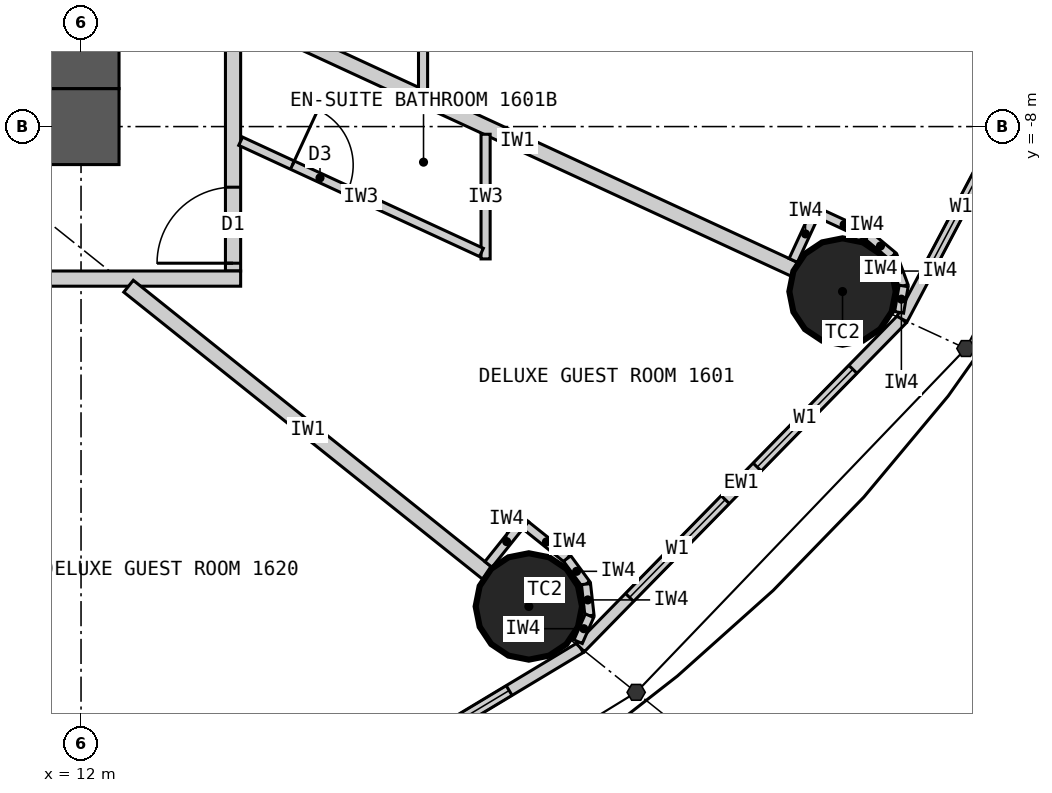
"""IFC4 building model, lengths in metres.
Left out: names, types, materials, properties, quantities, classifications, styles, units other than length and angle.
Written with IfcOpenShell. Run it as: python <this file> out.ifc"""

import sys

from ifc_helpers import new_model, si_unit, direction, frame, frame_2d, origin, origin_2d, place, context, subcontext, project, spatial, rectangle, circle, extrude, element, fill, save


model = new_model("IFC4")
c1 = context("Model", 3, precision=1e-05, world=origin(), true_north=direction((0.0, 1.0)))
c2 = subcontext(c1, "Body", "Model", "MODEL_VIEW")
j1 = project(units=[si_unit("LENGTHUNIT", "METRE"), si_unit("PLANEANGLEUNIT", "RADIAN")], contexts=[c1])
p1 = place(None, origin())
s1 = spatial("IfcSite", under=j1, at=p1, CompositionType="ELEMENT")
p2 = place(p1, origin())
s2 = spatial("IfcBuilding", under=s1, at=p2, CompositionType="ELEMENT")
p3 = place(p2, frame((0.0, 0.0, 67.2)))
s3 = spatial("IfcBuildingStorey", under=s2, at=p3, CompositionType="ELEMENT", Elevation=67.2)
for number, where, z_axis, x_axis in (
    (1, (17.892, -14.313, 0.0), (0.0, 0.0, 1.0), (1.0, 0.0, 0.0)),
    (2, (22.019, -10.17, 0.0), (0.0, 0.0, 1.0), (1.0, 0.0, 0.0)),
):
    element("IfcColumn", number, at=place(p3, frame(where, z_axis=z_axis, x_axis=x_axis)), inside=s3, PredefinedType="COLUMN", context=c2, shape_type="SweptSolid", body=[
        extrude(circle(Radius=0.7, at=origin_2d()), origin(), (0.0, 0.0, 1.0), 3.3),
    ])
p4 = place(p3, frame((12.5, -8.0, 0.0), z_axis=(0.0, 0.0, 1.0), x_axis=(-1.0, 0.0, 0.0)))
e3 = element("IfcWall", 3, at=p4, inside=s3, PredefinedType="SHEAR", context=c2, shape_type="SweptSolid", body=[
    extrude(rectangle(XDim=25.0, YDim=1.0, at=frame_2d((12.5, 0.0))), origin(), (0.0, 0.0, 1.0), 3.3),
])
p5 = place(p4, frame((11.2, 0.0, 0.0)))
e4 = element("IfcOpeningElement", 4, at=p5, cuts=e3, PredefinedType="OPENING", context=c2, shape_type="SweptSolid", body=[
    extrude(rectangle(XDim=1.2, YDim=2.2, at=frame_2d((0.6, 1.1))), frame((0.0, 0.51, 0.0), z_axis=(0.0, -1.0, 0.0), x_axis=(1.0, 0.0, 0.0)), (0.0, 0.0, 1.0), 1.02),
])
p6 = place(p4, frame((18.8, 0.0, 0.0)))
e5 = element("IfcOpeningElement", 5, at=p6, cuts=e3, PredefinedType="OPENING", context=c2, shape_type="SweptSolid", body=[
    extrude(rectangle(XDim=0.9, YDim=2.2, at=frame_2d((0.45, 1.1))), frame((0.0, 0.51, 0.0), z_axis=(0.0, -1.0, 0.0), x_axis=(1.0, 0.0, 0.0)), (0.0, 0.0, 1.0), 1.02),
])
p7 = place(p3, frame((12.0, -7.5, 0.0), z_axis=(0.0, 0.0, 1.0), x_axis=(0.0, 1.0, 0.0)))
e6 = element("IfcWall", 6, at=p7, inside=s3, PredefinedType="SHEAR", context=c2, shape_type="SweptSolid", body=[
    extrude(rectangle(XDim=15.0, YDim=1.0, at=frame_2d((7.5, 0.0))), origin(), (0.0, 0.0, 1.0), 3.3),
])
p8 = place(p7, frame((6.6, 0.0, 0.0)))
e7 = element("IfcOpeningElement", 7, at=p8, cuts=e6, PredefinedType="OPENING", context=c2, shape_type="SweptSolid", body=[
    extrude(rectangle(XDim=1.8, YDim=2.2, at=frame_2d((0.9, 1.1))), frame((0.0, 0.51, 0.0), z_axis=(0.0, -1.0, 0.0), x_axis=(1.0, 0.0, 0.0)), (0.0, 0.0, 1.0), 1.02),
])
p9 = place(p3, frame((13.096, -18.147, 0.0), z_axis=(0.0, 0.0, 1.0), x_axis=(0.856983180864, 0.515344377787, 0.0)))
e8 = element("IfcWall", 8, at=p9, inside=s3, PredefinedType="ELEMENTEDWALL", context=c2, shape_type="SweptSolid", body=[
    extrude(rectangle(XDim=6.386, YDim=0.15, at=frame_2d((3.193, 0.0))), origin(), (0.0, 0.0, 1.0), 3.12),
])
p10 = place(p9, frame((1.093, 0.0, 0.9)))
e9 = element("IfcOpeningElement", 9, at=p10, cuts=e8, PredefinedType="OPENING", context=c2, shape_type="SweptSolid", body=[
    extrude(rectangle(XDim=1.8, YDim=1.9, at=frame_2d((0.9, 0.95))), frame((0.0, 0.085, 0.0), z_axis=(0.0, -1.0, 0.0), x_axis=(1.0, 0.0, 0.0)), (0.0, 0.0, 1.0), 0.17),
])
p11 = place(p9, frame((3.493, 0.0, 0.9)))
e10 = element("IfcOpeningElement", 10, at=p11, cuts=e8, PredefinedType="OPENING", context=c2, shape_type="SweptSolid", body=[
    extrude(rectangle(XDim=1.8, YDim=1.9, at=frame_2d((0.9, 0.95))), frame((0.0, 0.085, 0.0), z_axis=(0.0, -1.0, 0.0), x_axis=(1.0, 0.0, 0.0)), (0.0, 0.0, 1.0), 0.17),
])
p12 = place(p3, frame((18.57, -14.856, 0.0), z_axis=(0.0, 0.0, 1.0), x_axis=(0.699602905915, 0.714531856557, 0.0)))
e11 = element("IfcWall", 11, at=p12, inside=s3, PredefinedType="ELEMENTEDWALL", context=c2, shape_type="SweptSolid", body=[
    extrude(rectangle(XDim=6.051, YDim=0.15, at=frame_2d((3.025, 0.0))), origin(), (0.0, 0.0, 1.0), 3.12),
])
p13 = place(p12, frame((0.926, 0.0, 0.9)))
e12 = element("IfcOpeningElement", 12, at=p13, cuts=e11, PredefinedType="OPENING", context=c2, shape_type="SweptSolid", body=[
    extrude(rectangle(XDim=1.8, YDim=1.9, at=frame_2d((0.9, 0.95))), frame((0.0, 0.085, 0.0), z_axis=(0.0, -1.0, 0.0), x_axis=(1.0, 0.0, 0.0)), (0.0, 0.0, 1.0), 0.17),
])
p14 = place(p12, frame((3.325, 0.0, 0.9)))
e13 = element("IfcOpeningElement", 13, at=p14, cuts=e11, PredefinedType="OPENING", context=c2, shape_type="SweptSolid", body=[
    extrude(rectangle(XDim=1.8, YDim=1.9, at=frame_2d((0.9, 0.95))), frame((0.0, 0.085, 0.0), z_axis=(0.0, -1.0, 0.0), x_axis=(1.0, 0.0, 0.0)), (0.0, 0.0, 1.0), 0.17),
])
p15 = place(p3, frame((22.803, -10.532, 0.0), z_axis=(0.0, 0.0, 1.0), x_axis=(0.467296867008, 0.884100468321, 0.0)))
e14 = element("IfcWall", 14, at=p15, inside=s3, PredefinedType="ELEMENTEDWALL", context=c2, shape_type="SweptSolid", body=[
    extrude(rectangle(XDim=5.734, YDim=0.15, at=frame_2d((2.867, 0.0))), origin(), (0.0, 0.0, 1.0), 3.12),
])
p16 = place(p15, frame((0.767, 0.0, 0.9)))
e15 = element("IfcOpeningElement", 15, at=p16, cuts=e14, PredefinedType="OPENING", context=c2, shape_type="SweptSolid", body=[
    extrude(rectangle(XDim=1.8, YDim=1.9, at=frame_2d((0.9, 0.95))), frame((0.0, 0.085, 0.0), z_axis=(0.0, -1.0, 0.0), x_axis=(1.0, 0.0, 0.0)), (0.0, 0.0, 1.0), 0.17),
])
p17 = place(p15, frame((3.167, 0.0, 0.9)))
e16 = element("IfcOpeningElement", 16, at=p17, cuts=e14, PredefinedType="OPENING", context=c2, shape_type="SweptSolid", body=[
    extrude(rectangle(XDim=1.8, YDim=1.9, at=frame_2d((0.9, 0.95))), frame((0.0, 0.085, 0.0), z_axis=(0.0, -1.0, 0.0), x_axis=(1.0, 0.0, 0.0)), (0.0, 0.0, 1.0), 0.17),
])
p18 = place(p3, frame((14.0, -9.9, 0.0), z_axis=(0.0, 0.0, 1.0), x_axis=(0.0, 1.0, 0.0)))
e17 = element("IfcWall", 17, at=p18, inside=s3, PredefinedType="PARTITIONING", context=c2, shape_type="SweptSolid", body=[
    extrude(rectangle(XDim=19.8, YDim=0.2, at=frame_2d((9.9, 0.0))), origin(), (0.0, 0.0, 1.0), 3.12),
])
p19 = place(p18, frame((0.103, 0.0, 0.0)))
e18 = element("IfcOpeningElement", 18, at=p19, cuts=e17, PredefinedType="OPENING", context=c2, shape_type="SweptSolid", body=[
    extrude(rectangle(XDim=1.0, YDim=2.2, at=frame_2d((0.5, 1.1))), frame((0.0, 0.11, 0.0), z_axis=(0.0, -1.0, 0.0), x_axis=(1.0, 0.0, 0.0)), (0.0, 0.0, 1.0), 0.22),
])
p20 = place(p18, frame((5.248, 0.0, 0.0)))
e19 = element("IfcOpeningElement", 19, at=p20, cuts=e17, PredefinedType="OPENING", context=c2, shape_type="SweptSolid", body=[
    extrude(rectangle(XDim=1.0, YDim=2.2, at=frame_2d((0.5, 1.1))), frame((0.0, 0.11, 0.0), z_axis=(0.0, -1.0, 0.0), x_axis=(1.0, 0.0, 0.0)), (0.0, 0.0, 1.0), 0.22),
])
p21 = place(p18, frame((8.438, 0.0, 0.0)))
e20 = element("IfcOpeningElement", 20, at=p21, cuts=e17, PredefinedType="OPENING", context=c2, shape_type="SweptSolid", body=[
    extrude(rectangle(XDim=1.0, YDim=2.2, at=frame_2d((0.5, 1.1))), frame((0.0, 0.11, 0.0), z_axis=(0.0, -1.0, 0.0), x_axis=(1.0, 0.0, 0.0)), (0.0, 0.0, 1.0), 0.22),
])
p22 = place(p18, frame((14.532, 0.0, 0.0)))
e21 = element("IfcOpeningElement", 21, at=p22, cuts=e17, PredefinedType="OPENING", context=c2, shape_type="SweptSolid", body=[
    extrude(rectangle(XDim=1.0, YDim=2.2, at=frame_2d((0.5, 1.1))), frame((0.0, 0.11, 0.0), z_axis=(0.0, -1.0, 0.0), x_axis=(1.0, 0.0, 0.0)), (0.0, 0.0, 1.0), 0.22),
])
p23 = place(p3, frame((14.1, -10.0, 0.0), z_axis=(0.0, 0.0, 1.0), x_axis=(-1.0, 0.0, 0.0)))
e22 = element("IfcWall", 22, at=p23, inside=s3, PredefinedType="PARTITIONING", context=c2, shape_type="SweptSolid", body=[
    extrude(rectangle(XDim=28.2, YDim=0.2, at=frame_2d((14.1, 0.0))), origin(), (0.0, 0.0, 1.0), 3.12),
])
p24 = place(p23, frame((23.865, 0.0, 0.0)))
e23 = element("IfcOpeningElement", 23, at=p24, cuts=e22, PredefinedType="OPENING", context=c2, shape_type="SweptSolid", body=[
    extrude(rectangle(XDim=1.0, YDim=2.2, at=frame_2d((0.5, 1.1))), frame((0.0, 0.11, 0.0), z_axis=(0.0, -1.0, 0.0), x_axis=(1.0, 0.0, 0.0)), (0.0, 0.0, 1.0), 0.22),
])
p25 = place(p23, frame((18.529, 0.0, 0.0)))
e24 = element("IfcOpeningElement", 24, at=p25, cuts=e22, PredefinedType="OPENING", context=c2, shape_type="SweptSolid", body=[
    extrude(rectangle(XDim=1.0, YDim=2.2, at=frame_2d((0.5, 1.1))), frame((0.0, 0.11, 0.0), z_axis=(0.0, -1.0, 0.0), x_axis=(1.0, 0.0, 0.0)), (0.0, 0.0, 1.0), 0.22),
])
p26 = place(p23, frame((14.623, 0.0, 0.0)))
e25 = element("IfcOpeningElement", 25, at=p26, cuts=e22, PredefinedType="OPENING", context=c2, shape_type="SweptSolid", body=[
    extrude(rectangle(XDim=1.0, YDim=2.2, at=frame_2d((0.5, 1.1))), frame((0.0, 0.11, 0.0), z_axis=(0.0, -1.0, 0.0), x_axis=(1.0, 0.0, 0.0)), (0.0, 0.0, 1.0), 0.22),
])
p27 = place(p23, frame((11.24, 0.0, 0.0)))
e26 = element("IfcOpeningElement", 26, at=p27, cuts=e22, PredefinedType="OPENING", context=c2, shape_type="SweptSolid", body=[
    extrude(rectangle(XDim=1.0, YDim=2.2, at=frame_2d((0.5, 1.1))), frame((0.0, 0.11, 0.0), z_axis=(0.0, -1.0, 0.0), x_axis=(1.0, 0.0, 0.0)), (0.0, 0.0, 1.0), 0.22),
])
p28 = place(p23, frame((8.671, 0.0, 0.0)))
e27 = element("IfcOpeningElement", 27, at=p28, cuts=e22, PredefinedType="OPENING", context=c2, shape_type="SweptSolid", body=[
    extrude(rectangle(XDim=1.0, YDim=2.2, at=frame_2d((0.5, 1.1))), frame((0.0, 0.11, 0.0), z_axis=(0.0, -1.0, 0.0), x_axis=(1.0, 0.0, 0.0)), (0.0, 0.0, 1.0), 0.22),
])
p29 = place(p23, frame((2.801, 0.0, 0.0)))
e28 = element("IfcOpeningElement", 28, at=p29, cuts=e22, PredefinedType="OPENING", context=c2, shape_type="SweptSolid", body=[
    extrude(rectangle(XDim=1.0, YDim=2.2, at=frame_2d((0.5, 1.1))), frame((0.0, 0.11, 0.0), z_axis=(0.0, -1.0, 0.0), x_axis=(1.0, 0.0, 0.0)), (0.0, 0.0, 1.0), 0.22),
])
p30 = place(p3, frame((7.289, -10.1, 0.0), z_axis=(0.0, 0.0, 1.0), x_axis=(0.585198353053, -0.810890182197, 0.0)))
e29 = element("IfcWall", 29, at=p30, inside=s3, PredefinedType="PARTITIONING", context=c2, shape_type="SweptSolid", body=[
    extrude(rectangle(XDim=8.36, YDim=0.2, at=frame_2d((4.18, 0.0))), origin(), (0.0, 0.0, 1.0), 2.32),
])
p31 = place(p3, frame((12.625, -10.1, 0.0), z_axis=(0.0, 0.0, 1.0), x_axis=(0.780892451574, -0.624665493744, 0.0)))
e30 = element("IfcWall", 30, at=p31, inside=s3, PredefinedType="PARTITIONING", context=c2, shape_type="SweptSolid", body=[
    extrude(rectangle(XDim=6.045, YDim=0.2, at=frame_2d((3.022, 0.0))), origin(), (0.0, 0.0, 1.0), 2.32),
])
p32 = place(p3, frame((14.1, -6.512, 0.0), z_axis=(0.0, 0.0, 1.0), x_axis=(0.907832871056, -0.419332181247, 0.0)))
e31 = element("IfcWall", 31, at=p32, inside=s3, PredefinedType="PARTITIONING", context=c2, shape_type="SweptSolid", body=[
    extrude(rectangle(XDim=8.023, YDim=0.2, at=frame_2d((4.011, 0.0))), origin(), (0.0, 0.0, 1.0), 2.32),
])
p33 = place(p3, frame((17.323, -8.101, 0.0), z_axis=(0.0, 0.0, 1.0), x_axis=(0.0, -1.0, 0.0)))
e32 = element("IfcWall", 32, at=p33, inside=s3, PredefinedType="PARTITIONING", context=c2, shape_type="SweptSolid", body=[
    extrude(rectangle(XDim=1.64, YDim=0.12, at=frame_2d((0.82, 0.0))), origin(), (0.0, 0.0, 1.0), 3.12),
])
p34 = place(p3, frame((14.1, -8.193, 0.0), z_axis=(0.0, 0.0, 1.0), x_axis=(0.907836493557, -0.419324338628, 0.0)))
e33 = element("IfcWall", 33, at=p34, inside=s3, PredefinedType="PARTITIONING", context=c2, shape_type="SweptSolid", body=[
    extrude(rectangle(XDim=3.49, YDim=0.12, at=frame_2d((1.745, 0.0))), origin(), (0.0, 0.0, 1.0), 3.12),
])
p35 = place(p34, frame((0.75, 0.0, 0.0)))
e34 = element("IfcOpeningElement", 34, at=p35, cuts=e33, PredefinedType="OPENING", context=c2, shape_type="SweptSolid", body=[
    extrude(rectangle(XDim=0.8, YDim=2.1, at=frame_2d((0.4, 1.05))), frame((0.0, 0.07, 0.0), z_axis=(0.0, -1.0, 0.0), x_axis=(1.0, 0.0, 0.0)), (0.0, 0.0, 1.0), 0.14),
])
p36 = place(p3, frame((16.5, -7.521, 0.0), z_axis=(0.0, 0.0, 1.0), x_axis=(0.0, 1.0, 0.0)))
e35 = element("IfcWall", 35, at=p36, inside=s3, PredefinedType="PARTITIONING", context=c2, shape_type="SweptSolid", body=[
    extrude(rectangle(XDim=2.749, YDim=0.12, at=frame_2d((1.374, 0.0))), origin(), (0.0, 0.0, 1.0), 3.12),
])
p37 = place(p3, frame((17.361, -13.76, 0.0), z_axis=(0.0, 0.0, 1.0), x_axis=(0.624501042889, 0.781023973659, 0.0)))
e36 = element("IfcWall", 36, at=p37, inside=s3, PredefinedType="PARTITIONING", context=c2, shape_type="SweptSolid", body=[
    extrude(rectangle(XDim=0.767, YDim=0.12, at=frame_2d((0.384, 0.0))), origin(), (0.0, 0.0, 1.0), 3.12),
])
p38 = place(p3, frame((17.85, -13.246, 0.0), z_axis=(0.0, 0.0, 1.0), x_axis=(0.780902834923, -0.62465251333, 0.0)))
e37 = element("IfcWall", 37, at=p38, inside=s3, PredefinedType="PARTITIONING", context=c2, shape_type="SweptSolid", body=[
    extrude(rectangle(XDim=0.7, YDim=0.12, at=frame_2d((0.35, 0.0))), origin(), (0.0, 0.0, 1.0), 3.12),
])
for number, where, z_axis, x_axis in (
    (38, (18.396, -13.683, 0.0), (0.0, 0.0, 1.0), (0.592, -0.806, 0.0)),
    (39, (18.644, -14.02, 0.0), (0.0, 0.0, 1.0), (0.11, -0.994, 0.0)),
):
    element("IfcWall", number, at=place(p3, frame(where, z_axis=z_axis, x_axis=x_axis)), inside=s3, PredefinedType="PARTITIONING", context=c2, shape_type="SweptSolid", body=[
        extrude(rectangle(XDim=0.418, YDim=0.12, at=frame_2d((0.209, 0.0))), origin(), (0.0, 0.0, 1.0), 3.12),
    ])
p39 = place(p3, frame((18.69, -14.435, 0.0), z_axis=(0.0, 0.0, 1.0), x_axis=(-0.401093412634, -0.91603715773, 0.0)))
e40 = element("IfcWall", 40, at=p39, inside=s3, PredefinedType="PARTITIONING", context=c2, shape_type="SweptSolid", body=[
    extrude(rectangle(XDim=0.373, YDim=0.12, at=frame_2d((0.187, 0.0))), origin(), (0.0, 0.0, 1.0), 3.12),
])
p40 = place(p3, frame((21.371, -9.761, 0.0), z_axis=(0.0, 0.0, 1.0), x_axis=(0.419259891039, 0.907866258744, 0.0)))
e41 = element("IfcWall", 41, at=p40, inside=s3, PredefinedType="PARTITIONING", context=c2, shape_type="SweptSolid", body=[
    extrude(rectangle(XDim=0.768, YDim=0.12, at=frame_2d((0.384, 0.0))), origin(), (0.0, 0.0, 1.0), 3.12),
])
p41 = place(p3, frame((21.722, -9.144, 0.0), z_axis=(0.0, 0.0, 1.0), x_axis=(0.907877701396, -0.419235112208, 0.0)))
e42 = element("IfcWall", 42, at=p41, inside=s3, PredefinedType="PARTITIONING", context=c2, shape_type="SweptSolid", body=[
    extrude(rectangle(XDim=0.7, YDim=0.12, at=frame_2d((0.35, 0.0))), origin(), (0.0, 0.0, 1.0), 3.12),
])
p42 = place(p3, frame((22.358, -9.437, 0.0), z_axis=(0.0, 0.0, 1.0), x_axis=(0.768412687942, -0.639954639806, 0.0)))
e43 = element("IfcWall", 43, at=p42, inside=s3, PredefinedType="PARTITIONING", context=c2, shape_type="SweptSolid", body=[
    extrude(rectangle(XDim=0.418, YDim=0.12, at=frame_2d((0.209, 0.0))), origin(), (0.0, 0.0, 1.0), 3.12),
])
p43 = place(p3, frame((22.679, -9.705, 0.0), z_axis=(0.0, 0.0, 1.0), x_axis=(0.345164001646, -0.938542386879, 0.0)))
e44 = element("IfcWall", 44, at=p43, inside=s3, PredefinedType="PARTITIONING", context=c2, shape_type="SweptSolid", body=[
    extrude(rectangle(XDim=0.418, YDim=0.12, at=frame_2d((0.209, 0.0))), origin(), (0.0, 0.0, 1.0), 3.12),
])
p44 = place(p3, frame((22.823, -10.097, 0.0), z_axis=(0.0, 0.0, 1.0), x_axis=(-0.169674995186, -0.985500074079, 0.0)))
e45 = element("IfcWall", 45, at=p44, inside=s3, PredefinedType="PARTITIONING", context=c2, shape_type="SweptSolid", body=[
    extrude(rectangle(XDim=0.353, YDim=0.12, at=frame_2d((0.176, 0.0))), origin(), (0.0, 0.0, 1.0), 3.12),
])
p45 = place(p11, origin())
e46 = element("IfcWindow", 46, at=p45, inside=s3, PartitioningType="SINGLE_PANEL", PredefinedType="WINDOW", context=c2, shape_type="SweptSolid", body=[
    extrude(rectangle(XDim=1.8, YDim=1.9, at=frame_2d((0.9, 0.95))), frame((0.0, 0.03, 0.0), z_axis=(0.0, -1.0, 0.0), x_axis=(1.0, 0.0, 0.0)), (0.0, 0.0, 1.0), 0.06),
])
fill(e10, e46)
p46 = place(p13, origin())
e47 = element("IfcWindow", 47, at=p46, inside=s3, PartitioningType="SINGLE_PANEL", PredefinedType="WINDOW", context=c2, shape_type="SweptSolid", body=[
    extrude(rectangle(XDim=1.8, YDim=1.9, at=frame_2d((0.9, 0.95))), frame((0.0, 0.03, 0.0), z_axis=(0.0, -1.0, 0.0), x_axis=(1.0, 0.0, 0.0)), (0.0, 0.0, 1.0), 0.06),
])
fill(e12, e47)
p47 = place(p14, origin())
e48 = element("IfcWindow", 48, at=p47, inside=s3, PartitioningType="SINGLE_PANEL", PredefinedType="WINDOW", context=c2, shape_type="SweptSolid", body=[
    extrude(rectangle(XDim=1.8, YDim=1.9, at=frame_2d((0.9, 0.95))), frame((0.0, 0.03, 0.0), z_axis=(0.0, -1.0, 0.0), x_axis=(1.0, 0.0, 0.0)), (0.0, 0.0, 1.0), 0.06),
])
fill(e13, e48)
p48 = place(p16, origin())
e49 = element("IfcWindow", 49, at=p48, inside=s3, PartitioningType="SINGLE_PANEL", PredefinedType="WINDOW", context=c2, shape_type="SweptSolid", body=[
    extrude(rectangle(XDim=1.8, YDim=1.9, at=frame_2d((0.9, 0.95))), frame((0.0, 0.03, 0.0), z_axis=(0.0, -1.0, 0.0), x_axis=(1.0, 0.0, 0.0)), (0.0, 0.0, 1.0), 0.06),
])
fill(e15, e49)
p49 = place(p35, origin())
e50 = element("IfcDoor", 50, at=p49, inside=s3, OperationType="SINGLE_SWING_LEFT", PredefinedType="DOOR", context=c2, shape_type="SweptSolid", body=[
    extrude(rectangle(XDim=0.8, YDim=2.1, at=frame_2d((0.4, 1.05))), frame((0.0, 0.025, 0.0), z_axis=(0.0, -1.0, 0.0), x_axis=(1.0, 0.0, 0.0)), (0.0, 0.0, 1.0), 0.05),
])
fill(e34, e50)
p50 = place(p19, origin())
e51 = element("IfcDoor", 51, at=p50, inside=s3, OperationType="SINGLE_SWING_LEFT", PredefinedType="DOOR", context=c2, shape_type="SweptSolid", body=[
    extrude(rectangle(XDim=1.0, YDim=2.2, at=frame_2d((0.5, 1.1))), frame((0.0, 0.025, 0.0), z_axis=(0.0, -1.0, 0.0), x_axis=(1.0, 0.0, 0.0)), (0.0, 0.0, 1.0), 0.05),
])
fill(e18, e51)
save(model, sys.argv[1])
